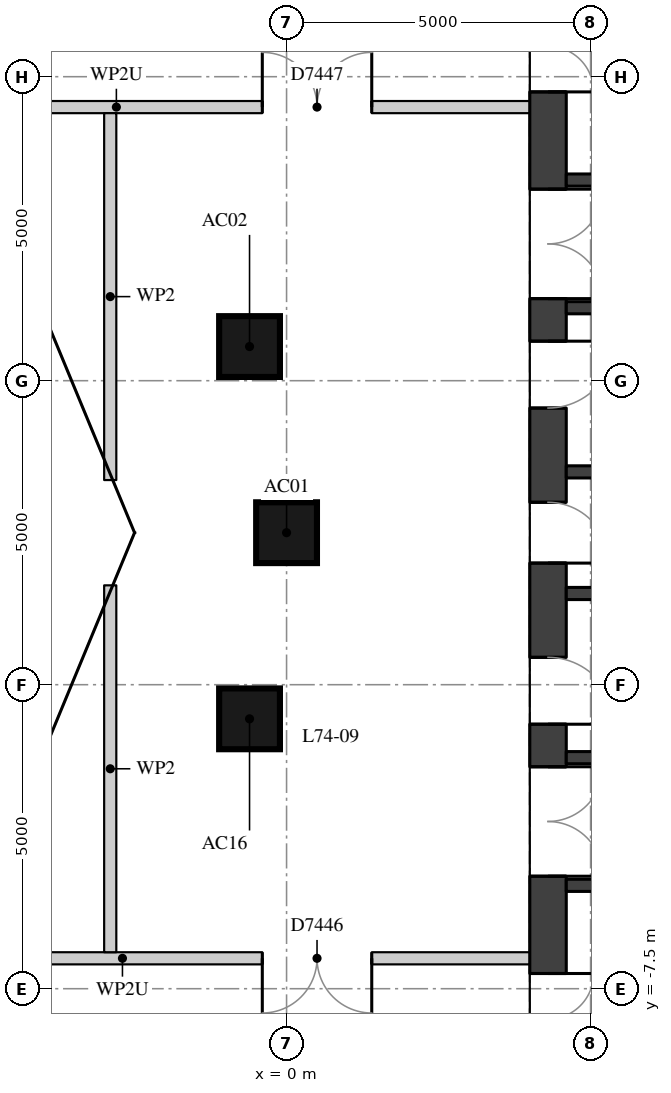
"""IFC4 building model, lengths in metres.
Left out: names, types, materials, properties, quantities, classifications, styles, units other than length and angle.
Written with IfcOpenShell. Run it as: python <this file> out.ifc"""

import sys

from ifc_helpers import new_model, si_unit, direction, frame, frame_2d, origin, origin_2d, place, context, subcontext, project, spatial, rectangle, extrude, element, fill, save


model = new_model("IFC4")
c1 = context("Model", 3, precision=1e-05, world=origin(), true_north=direction((0.0, 1.0)))
c2 = subcontext(c1, "Body", "Model", "MODEL_VIEW")
j1 = project(units=[si_unit("LENGTHUNIT", "METRE"), si_unit("PLANEANGLEUNIT", "RADIAN")], contexts=[c1])
p1 = place(None, origin())
s1 = spatial("IfcSite", under=j1, at=p1, CompositionType="ELEMENT")
p2 = place(p1, origin())
s2 = spatial("IfcBuilding", under=s1, at=p2, CompositionType="ELEMENT")
p3 = place(p2, frame((0.0, 0.0, 259.7)))
s3 = spatial("IfcBuildingStorey", under=s2, at=p3, CompositionType="ELEMENT", Elevation=259.7)
for number, where, z_axis, x_axis in (
    (1, (0.0, 0.0, 0.0), (0.0, 0.0, 1.0), (1.0, 0.0, 0.0)),
    (2, (-0.609, 3.062, 0.0), (0.0, 0.0, 1.0), (1.0, 0.0, 0.0)),
    (3, (-0.609, -3.062, 0.0), (0.0, 0.0, 1.0), (1.0, 0.0, 0.0)),
):
    element("IfcColumn", number, at=place(p3, frame(where, z_axis=z_axis, x_axis=x_axis)), inside=s3, PredefinedType="COLUMN", context=c2, shape_type="SweptSolid", body=[
        extrude(rectangle(XDim=1.0, YDim=1.0, at=origin_2d()), origin(), (0.0, 0.0, 1.0), 4.5),
    ])
p4 = place(p3, frame((4.3, -9.4, 0.0), z_axis=(0.0, 0.0, 1.0), x_axis=(0.0, 1.0, 0.0)))
e4 = element("IfcWall", 4, at=p4, inside=s3, PredefinedType="SHEAR", context=c2, shape_type="SweptSolid", body=[
    extrude(rectangle(XDim=18.8, YDim=0.6, at=frame_2d((9.4, 0.0))), origin(), (0.0, 0.0, 1.0), 4.15),
])
p5 = place(p4, frame((0.65, 0.0, 0.0)))
e5 = element("IfcOpeningElement", 5, at=p5, cuts=e4, PredefinedType="OPENING", context=c2, shape_type="SweptSolid", body=[
    extrude(rectangle(XDim=1.5, YDim=2.1, at=frame_2d((0.75, 1.05))), frame((0.0, 0.31, 0.0), z_axis=(0.0, -1.0, 0.0), x_axis=(1.0, 0.0, 0.0)), (0.0, 0.0, 1.0), 0.62),
])
p6 = place(p4, frame((3.75, 0.0, 0.0)))
e6 = element("IfcOpeningElement", 6, at=p6, cuts=e4, PredefinedType="OPENING", context=c2, shape_type="SweptSolid", body=[
    extrude(rectangle(XDim=1.8, YDim=2.1, at=frame_2d((0.9, 1.05))), frame((0.0, 0.31, 0.0), z_axis=(0.0, -1.0, 0.0), x_axis=(1.0, 0.0, 0.0)), (0.0, 0.0, 1.0), 0.62),
])
p7 = place(p4, frame((6.25, 0.0, 0.0)))
e7 = element("IfcOpeningElement", 7, at=p7, cuts=e4, PredefinedType="OPENING", context=c2, shape_type="SweptSolid", body=[
    extrude(rectangle(XDim=1.1, YDim=2.1, at=frame_2d((0.55, 1.05))), frame((0.0, 0.31, 0.0), z_axis=(0.0, -1.0, 0.0), x_axis=(1.0, 0.0, 0.0)), (0.0, 0.0, 1.0), 0.62),
])
p8 = place(p4, frame((8.9, 0.0, 0.0)))
e8 = element("IfcOpeningElement", 8, at=p8, cuts=e4, PredefinedType="OPENING", context=c2, shape_type="SweptSolid", body=[
    extrude(rectangle(XDim=1.0, YDim=2.1, at=frame_2d((0.5, 1.05))), frame((0.0, 0.31, 0.0), z_axis=(0.0, -1.0, 0.0), x_axis=(1.0, 0.0, 0.0)), (0.0, 0.0, 1.0), 0.62),
])
p9 = place(p4, frame((11.45, 0.0, 0.0)))
e9 = element("IfcOpeningElement", 9, at=p9, cuts=e4, PredefinedType="OPENING", context=c2, shape_type="SweptSolid", body=[
    extrude(rectangle(XDim=1.1, YDim=2.1, at=frame_2d((0.55, 1.05))), frame((0.0, 0.31, 0.0), z_axis=(0.0, -1.0, 0.0), x_axis=(1.0, 0.0, 0.0)), (0.0, 0.0, 1.0), 0.62),
])
p10 = place(p4, frame((13.25, 0.0, 0.0)))
e10 = element("IfcOpeningElement", 10, at=p10, cuts=e4, PredefinedType="OPENING", context=c2, shape_type="SweptSolid", body=[
    extrude(rectangle(XDim=1.8, YDim=2.1, at=frame_2d((0.9, 1.05))), frame((0.0, 0.31, 0.0), z_axis=(0.0, -1.0, 0.0), x_axis=(1.0, 0.0, 0.0)), (0.0, 0.0, 1.0), 0.62),
])
p11 = place(p4, frame((16.65, 0.0, 0.0)))
e11 = element("IfcOpeningElement", 11, at=p11, cuts=e4, PredefinedType="OPENING", context=c2, shape_type="SweptSolid", body=[
    extrude(rectangle(XDim=1.5, YDim=2.1, at=frame_2d((0.75, 1.05))), frame((0.0, 0.31, 0.0), z_axis=(0.0, -1.0, 0.0), x_axis=(1.0, 0.0, 0.0)), (0.0, 0.0, 1.0), 0.62),
])
p12 = place(p3, frame((4.6, 5.8, 0.0), z_axis=(0.0, 0.0, 1.0), x_axis=(1.0, 0.0, 0.0)))
e12 = element("IfcWall", 12, at=p12, inside=s3, PredefinedType="SHEAR", context=c2, shape_type="SweptSolid", body=[
    extrude(rectangle(XDim=10.8, YDim=0.2, at=frame_2d((5.4, 0.0))), origin(), (0.0, 0.0, 1.0), 4.15),
])
p13 = place(p12, frame((7.05, 0.0, 0.0)))
e13 = element("IfcOpeningElement", 13, at=p13, cuts=e12, PredefinedType="OPENING", context=c2, shape_type="SweptSolid", body=[
    extrude(rectangle(XDim=1.1, YDim=2.1, at=frame_2d((0.55, 1.05))), frame((0.0, 0.11, 0.0), z_axis=(0.0, -1.0, 0.0), x_axis=(1.0, 0.0, 0.0)), (0.0, 0.0, 1.0), 0.22),
])
p14 = place(p12, frame((9.05, 0.0, 0.0)))
e14 = element("IfcOpeningElement", 14, at=p14, cuts=e12, PredefinedType="OPENING", context=c2, shape_type="SweptSolid", body=[
    extrude(rectangle(XDim=1.1, YDim=2.1, at=frame_2d((0.55, 1.05))), frame((0.0, 0.11, 0.0), z_axis=(0.0, -1.0, 0.0), x_axis=(1.0, 0.0, 0.0)), (0.0, 0.0, 1.0), 0.22),
])
p15 = place(p3, frame((4.6, 3.7, 0.0), z_axis=(0.0, 0.0, 1.0), x_axis=(1.0, 0.0, 0.0)))
e15 = element("IfcWall", 15, at=p15, inside=s3, PredefinedType="SHEAR", context=c2, shape_type="SweptSolid", body=[
    extrude(rectangle(XDim=10.8, YDim=0.2, at=frame_2d((5.4, 0.0))), origin(), (0.0, 0.0, 1.0), 4.15),
])
p16 = place(p15, frame((6.6, 0.0, 0.0)))
e16 = element("IfcOpeningElement", 16, at=p16, cuts=e15, PredefinedType="OPENING", context=c2, shape_type="SweptSolid", body=[
    extrude(rectangle(XDim=1.1, YDim=2.1, at=frame_2d((0.55, 1.05))), frame((0.0, 0.11, 0.0), z_axis=(0.0, -1.0, 0.0), x_axis=(1.0, 0.0, 0.0)), (0.0, 0.0, 1.0), 0.22),
])
p17 = place(p15, frame((8.9, 0.0, 0.0)))
e17 = element("IfcOpeningElement", 17, at=p17, cuts=e15, PredefinedType="OPENING", context=c2, shape_type="SweptSolid", body=[
    extrude(rectangle(XDim=1.1, YDim=2.1, at=frame_2d((0.55, 1.05))), frame((0.0, 0.11, 0.0), z_axis=(0.0, -1.0, 0.0), x_axis=(1.0, 0.0, 0.0)), (0.0, 0.0, 1.0), 0.22),
])
for number, where, z_axis, x_axis in (
    (18, (4.6, 1.0, 0.0), (0.0, 0.0, 1.0), (1.0, 0.0, 0.0)),
    (19, (4.6, -1.0, 0.0), (0.0, 0.0, 1.0), (1.0, 0.0, 0.0)),
):
    element("IfcWall", number, at=place(p3, frame(where, z_axis=z_axis, x_axis=x_axis)), inside=s3, PredefinedType="SHEAR", context=c2, shape_type="SweptSolid", body=[
        extrude(rectangle(XDim=10.8, YDim=0.2, at=frame_2d((5.4, 0.0))), origin(), (0.0, 0.0, 1.0), 4.15),
    ])
p18 = place(p3, frame((4.6, -3.7, 0.0), z_axis=(0.0, 0.0, 1.0), x_axis=(1.0, 0.0, 0.0)))
e20 = element("IfcWall", 20, at=p18, inside=s3, PredefinedType="SHEAR", context=c2, shape_type="SweptSolid", body=[
    extrude(rectangle(XDim=10.8, YDim=0.2, at=frame_2d((5.4, 0.0))), origin(), (0.0, 0.0, 1.0), 4.15),
])
p19 = place(p18, frame((6.6, 0.0, 0.0)))
e21 = element("IfcOpeningElement", 21, at=p19, cuts=e20, PredefinedType="OPENING", context=c2, shape_type="SweptSolid", body=[
    extrude(rectangle(XDim=1.1, YDim=2.1, at=frame_2d((0.55, 1.05))), frame((0.0, 0.11, 0.0), z_axis=(0.0, -1.0, 0.0), x_axis=(1.0, 0.0, 0.0)), (0.0, 0.0, 1.0), 0.22),
])
p20 = place(p18, frame((8.9, 0.0, 0.0)))
e22 = element("IfcOpeningElement", 22, at=p20, cuts=e20, PredefinedType="OPENING", context=c2, shape_type="SweptSolid", body=[
    extrude(rectangle(XDim=1.1, YDim=2.1, at=frame_2d((0.55, 1.05))), frame((0.0, 0.11, 0.0), z_axis=(0.0, -1.0, 0.0), x_axis=(1.0, 0.0, 0.0)), (0.0, 0.0, 1.0), 0.22),
])
p21 = place(p3, frame((4.6, -5.8, 0.0), z_axis=(0.0, 0.0, 1.0), x_axis=(1.0, 0.0, 0.0)))
e23 = element("IfcWall", 23, at=p21, inside=s3, PredefinedType="SHEAR", context=c2, shape_type="SweptSolid", body=[
    extrude(rectangle(XDim=10.8, YDim=0.2, at=frame_2d((5.4, 0.0))), origin(), (0.0, 0.0, 1.0), 4.15),
])
p22 = place(p21, frame((7.0, 0.0, 0.0)))
e24 = element("IfcOpeningElement", 24, at=p22, cuts=e23, PredefinedType="OPENING", context=c2, shape_type="SweptSolid", body=[
    extrude(rectangle(XDim=1.2, YDim=2.1, at=frame_2d((0.6, 1.05))), frame((0.0, 0.11, 0.0), z_axis=(0.0, -1.0, 0.0), x_axis=(1.0, 0.0, 0.0)), (0.0, 0.0, 1.0), 0.22),
])
p23 = place(p3, frame((-9.4, -7.0, 0.0), z_axis=(0.0, 0.0, 1.0), x_axis=(1.0, 0.0, 0.0)))
e25 = element("IfcWall", 25, at=p23, inside=s3, PredefinedType="PARTITIONING", context=c2, shape_type="SweptSolid", body=[
    extrude(rectangle(XDim=13.402, YDim=0.2, at=frame_2d((6.701, 0.0))), origin(), (0.0, 0.0, 1.0), 3.6),
])
p24 = place(p23, frame((9.001, 0.0, 0.0)))
e26 = element("IfcOpeningElement", 26, at=p24, cuts=e25, PredefinedType="OPENING", context=c2, shape_type="SweptSolid", body=[
    extrude(rectangle(XDim=1.8, YDim=2.1, at=frame_2d((0.9, 1.05))), frame((0.0, 0.11, 0.0), z_axis=(0.0, -1.0, 0.0), x_axis=(1.0, 0.0, 0.0)), (0.0, 0.0, 1.0), 0.22),
])
p25 = place(p3, frame((-9.6, 7.0, 0.0), z_axis=(0.0, 0.0, 1.0), x_axis=(1.0, 0.0, 0.0)))
e27 = element("IfcWall", 27, at=p25, inside=s3, PredefinedType="PARTITIONING", context=c2, shape_type="SweptSolid", body=[
    extrude(rectangle(XDim=13.602, YDim=0.2, at=frame_2d((6.801, 0.0))), origin(), (0.0, 0.0, 1.0), 3.6),
])
p26 = place(p25, frame((9.201, 0.0, 0.0)))
e28 = element("IfcOpeningElement", 28, at=p26, cuts=e27, PredefinedType="OPENING", context=c2, shape_type="SweptSolid", body=[
    extrude(rectangle(XDim=1.8, YDim=2.1, at=frame_2d((0.9, 1.05))), frame((0.0, 0.11, 0.0), z_axis=(0.0, -1.0, 0.0), x_axis=(1.0, 0.0, 0.0)), (0.0, 0.0, 1.0), 0.22),
])
for number, where, z_axis, x_axis in (
    (29, (-2.9, -6.9, 0.0), (0.0, 0.0, 1.0), (0.0, 1.0, 0.0)),
    (30, (-2.9, 0.866, 0.0), (0.0, 0.0, 1.0), (0.0, 1.0, 0.0)),
):
    element("IfcWall", number, at=place(p3, frame(where, z_axis=z_axis, x_axis=x_axis)), inside=s3, PredefinedType="PARTITIONING", context=c2, shape_type="SweptSolid", body=[
        extrude(rectangle(XDim=6.034, YDim=0.2, at=frame_2d((3.017, 0.0))), origin(), (0.0, 0.0, 1.0), 4.15),
    ])
p27 = place(p5, origin())
e31 = element("IfcDoor", 31, at=p27, inside=s3, OperationType="DOUBLE_DOOR_SINGLE_SWING", PredefinedType="DOOR", context=c2, shape_type="SweptSolid", body=[
    extrude(rectangle(XDim=1.5, YDim=2.1, at=frame_2d((0.75, 1.05))), frame((0.0, 0.025, 0.0), z_axis=(0.0, -1.0, 0.0), x_axis=(1.0, 0.0, 0.0)), (0.0, 0.0, 1.0), 0.05),
])
fill(e5, e31)
p28 = place(p6, origin())
e32 = element("IfcDoor", 32, at=p28, inside=s3, OperationType="DOUBLE_DOOR_SINGLE_SWING", PredefinedType="DOOR", context=c2, shape_type="SweptSolid", body=[
    extrude(rectangle(XDim=1.8, YDim=2.1, at=frame_2d((0.9, 1.05))), frame((0.0, 0.025, 0.0), z_axis=(0.0, -1.0, 0.0), x_axis=(1.0, 0.0, 0.0)), (0.0, 0.0, 1.0), 0.05),
])
fill(e6, e32)
p29 = place(p7, origin())
e33 = element("IfcDoor", 33, at=p29, inside=s3, OperationType="SINGLE_SWING_RIGHT", PredefinedType="DOOR", context=c2, shape_type="SweptSolid", body=[
    extrude(rectangle(XDim=1.1, YDim=2.1, at=frame_2d((0.55, 1.05))), frame((0.0, 0.025, 0.0), z_axis=(0.0, -1.0, 0.0), x_axis=(1.0, 0.0, 0.0)), (0.0, 0.0, 1.0), 0.05),
])
fill(e7, e33)
p30 = place(p8, origin())
e34 = element("IfcDoor", 34, at=p30, inside=s3, OperationType="SINGLE_SWING_RIGHT", PredefinedType="DOOR", context=c2, shape_type="SweptSolid", body=[
    extrude(rectangle(XDim=1.0, YDim=2.1, at=frame_2d((0.5, 1.05))), frame((0.0, 0.025, 0.0), z_axis=(0.0, -1.0, 0.0), x_axis=(1.0, 0.0, 0.0)), (0.0, 0.0, 1.0), 0.05),
])
fill(e8, e34)
p31 = place(p9, origin())
e35 = element("IfcDoor", 35, at=p31, inside=s3, OperationType="SINGLE_SWING_LEFT", PredefinedType="DOOR", context=c2, shape_type="SweptSolid", body=[
    extrude(rectangle(XDim=1.1, YDim=2.1, at=frame_2d((0.55, 1.05))), frame((0.0, 0.025, 0.0), z_axis=(0.0, -1.0, 0.0), x_axis=(1.0, 0.0, 0.0)), (0.0, 0.0, 1.0), 0.05),
])
fill(e9, e35)
p32 = place(p10, origin())
e36 = element("IfcDoor", 36, at=p32, inside=s3, OperationType="DOUBLE_DOOR_SINGLE_SWING", PredefinedType="DOOR", context=c2, shape_type="SweptSolid", body=[
    extrude(rectangle(XDim=1.8, YDim=2.1, at=frame_2d((0.9, 1.05))), frame((0.0, 0.025, 0.0), z_axis=(0.0, -1.0, 0.0), x_axis=(1.0, 0.0, 0.0)), (0.0, 0.0, 1.0), 0.05),
])
fill(e10, e36)
p33 = place(p11, origin())
e37 = element("IfcDoor", 37, at=p33, inside=s3, OperationType="DOUBLE_DOOR_SINGLE_SWING", PredefinedType="DOOR", context=c2, shape_type="SweptSolid", body=[
    extrude(rectangle(XDim=1.5, YDim=2.1, at=frame_2d((0.75, 1.05))), frame((0.0, 0.025, 0.0), z_axis=(0.0, -1.0, 0.0), x_axis=(1.0, 0.0, 0.0)), (0.0, 0.0, 1.0), 0.05),
])
fill(e11, e37)
p34 = place(p26, origin())
e38 = element("IfcDoor", 38, at=p34, inside=s3, OperationType="DOUBLE_DOOR_SINGLE_SWING", PredefinedType="DOOR", context=c2, shape_type="SweptSolid", body=[
    extrude(rectangle(XDim=1.8, YDim=2.1, at=frame_2d((0.9, 1.05))), frame((0.0, 0.025, 0.0), z_axis=(0.0, -1.0, 0.0), x_axis=(1.0, 0.0, 0.0)), (0.0, 0.0, 1.0), 0.05),
])
fill(e28, e38)
p35 = place(p24, origin())
e39 = element("IfcDoor", 39, at=p35, inside=s3, OperationType="DOUBLE_DOOR_SINGLE_SWING", PredefinedType="DOOR", context=c2, shape_type="SweptSolid", body=[
    extrude(rectangle(XDim=1.8, YDim=2.1, at=frame_2d((0.9, 1.05))), frame((0.0, 0.025, 0.0), z_axis=(0.0, -1.0, 0.0), x_axis=(1.0, 0.0, 0.0)), (0.0, 0.0, 1.0), 0.05),
])
fill(e26, e39)
save(model, sys.argv[1])
